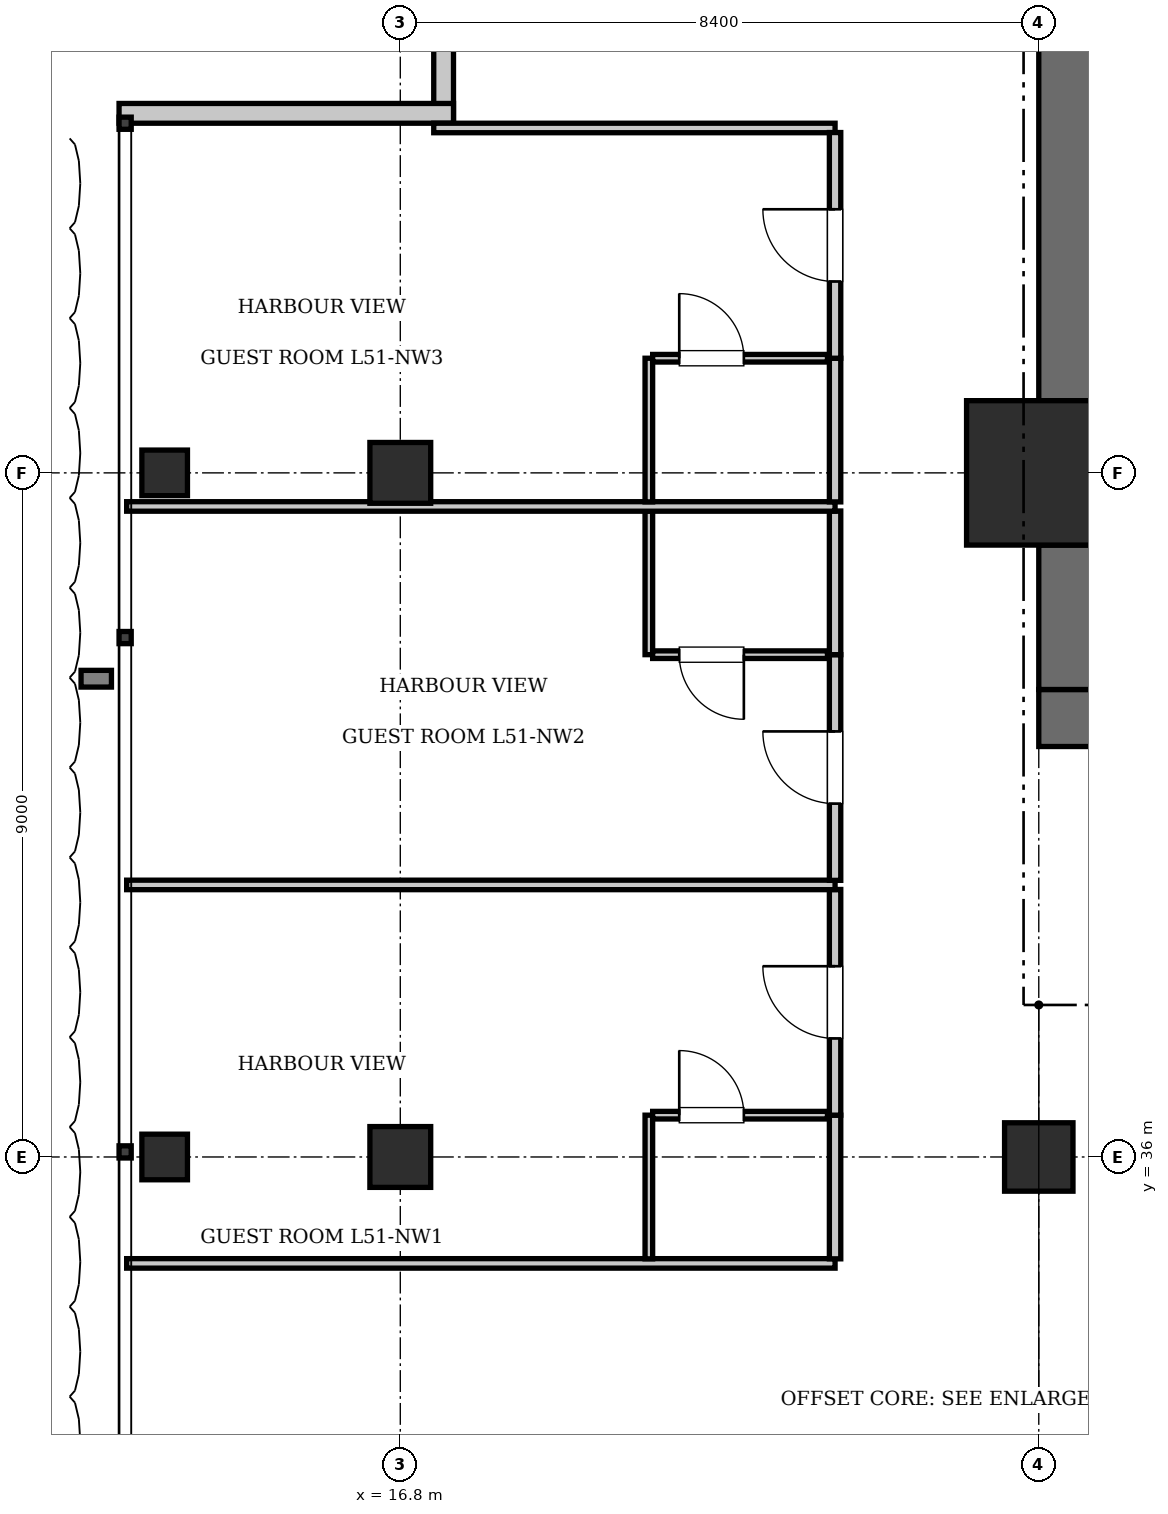
"""IFC4 building model, lengths in metres.
Left out: names, types, materials, properties, quantities, classifications, styles, units other than length and angle.
Written with IfcOpenShell. Run it as: python <this file> out.ifc"""

import sys

from ifc_helpers import new_model, si_unit, direction, frame, frame_2d, origin, origin_2d, place, context, subcontext, project, spatial, rectangle, i_section, extrude, element, fill, save


model = new_model("IFC4")
c1 = context("Model", 3, precision=1e-05, world=origin(), true_north=direction((0.0, 1.0)))
c2 = subcontext(c1, "Body", "Model", "MODEL_VIEW")
j1 = project(units=[si_unit("LENGTHUNIT", "METRE"), si_unit("PLANEANGLEUNIT", "RADIAN")], contexts=[c1])
p1 = place(None, origin())
s1 = spatial("IfcSite", under=j1, at=p1, CompositionType="ELEMENT")
p2 = place(p1, origin())
s2 = spatial("IfcBuilding", under=s1, at=p2, CompositionType="ELEMENT")
p3 = place(p2, frame((0.0, 0.0, 208.25)))
s3 = spatial("IfcBuildingStorey", under=s2, at=p3, CompositionType="ELEMENT", Elevation=208.25)
p4 = place(p3, frame((25.2, 45.0, 0.0), z_axis=(0.0, 0.0, 1.0), x_axis=(1.0, 0.0, 0.0)))
e1 = element("IfcColumn", 1, at=p4, inside=s3, PredefinedType="COLUMN", context=c2, shape_type="SweptSolid", body=[
    extrude(rectangle(XDim=1.9, YDim=1.9, at=origin_2d()), origin(), (0.0, 0.0, 1.0), 3.85),
])
p5 = place(p3, frame((25.2, 41.775, 0.0), z_axis=(0.0, 0.0, 1.0), x_axis=(1.0, 0.0, 0.0)))
e2 = element("IfcWall", 2, at=p5, inside=s3, PredefinedType="SHEAR", context=c2, shape_type="SweptSolid", body=[
    extrude(rectangle(XDim=6.8, YDim=0.75, at=frame_2d((3.4, 0.0))), origin(), (0.0, 0.0, 1.0), 3.85),
])
p6 = place(p5, frame((1.65, 0.0, 0.0)))
e3 = element("IfcOpeningElement", 3, at=p6, cuts=e2, PredefinedType="OPENING", context=c2, shape_type="SweptSolid", body=[
    extrude(rectangle(XDim=1.15, YDim=2.15, at=frame_2d((0.575, 1.075))), frame((0.0, 0.385, 0.0), z_axis=(0.0, -1.0, 0.0), x_axis=(1.0, 0.0, 0.0)), (0.0, 0.0, 1.0), 0.77),
])
p7 = place(p5, frame((5.15, 0.0, 0.0)))
e4 = element("IfcOpeningElement", 4, at=p7, cuts=e2, PredefinedType="OPENING", context=c2, shape_type="SweptSolid", body=[
    extrude(rectangle(XDim=1.1, YDim=2.2, at=frame_2d((0.55, 1.1))), frame((0.0, 0.385, 0.0), z_axis=(0.0, -1.0, 0.0), x_axis=(1.0, 0.0, 0.0)), (0.0, 0.0, 1.0), 0.77),
])
p8 = place(p3, frame((25.575, 42.15, 0.0), z_axis=(0.0, 0.0, 1.0), x_axis=(0.0, 1.0, 0.0)))
e5 = element("IfcWall", 5, at=p8, inside=s3, PredefinedType="SHEAR", context=c2, shape_type="SweptSolid", body=[
    extrude(rectangle(XDim=1.9, YDim=0.75, at=frame_2d((0.95, 0.0))), origin(), (0.0, 0.0, 1.0), 3.85),
])
p9 = place(p3, frame((25.575, 45.95, 0.0), z_axis=(0.0, 0.0, 1.0), x_axis=(0.0, 1.0, 0.0)))
e6 = element("IfcWall", 6, at=p9, inside=s3, PredefinedType="SHEAR", context=c2, shape_type="SweptSolid", body=[
    extrude(rectangle(XDim=7.3, YDim=0.75, at=frame_2d((3.65, 0.0))), origin(), (0.0, 0.0, 1.0), 3.85),
])
p10 = place(p3, frame((25.2, 36.0, 0.0), z_axis=(0.0, 0.0, 1.0), x_axis=(1.0, 0.0, 0.0)))
e7 = element("IfcColumn", 7, at=p10, inside=s3, PredefinedType="COLUMN", context=c2, shape_type="SweptSolid", body=[
    extrude(rectangle(XDim=0.9, YDim=0.9, at=origin_2d()), origin(), (0.0, 0.0, 1.0), 3.85),
])
for number, where, z_axis, x_axis in (
    (8, (16.8, 36.0, 0.0), (0.0, 0.0, 1.0), (1.0, 0.0, 0.0)),
    (9, (16.8, 45.0, 0.0), (0.0, 0.0, 1.0), (1.0, 0.0, 0.0)),
):
    element("IfcColumn", number, at=place(p3, frame(where, z_axis=z_axis, x_axis=x_axis)), inside=s3, PredefinedType="COLUMN", context=c2, shape_type="SweptSolid", body=[
        extrude(rectangle(XDim=0.8, YDim=0.8, at=origin_2d()), origin(), (0.0, 0.0, 1.0), 3.85),
    ])
for number, where, z_axis, x_axis in (
    (10, (13.7, 36.0, 0.0), (0.0, 0.0, 1.0), (1.0, 0.0, 0.0)),
    (11, (13.7, 45.0, 0.0), (0.0, 0.0, 1.0), (1.0, 0.0, 0.0)),
):
    element("IfcColumn", number, at=place(p3, frame(where, z_axis=z_axis, x_axis=x_axis)), inside=s3, PredefinedType="COLUMN", context=c2, shape_type="SweptSolid", body=[
        extrude(i_section(OverallWidth=0.6, OverallDepth=0.6, WebThickness=0.025, FlangeThickness=0.038, at=origin_2d()), origin(), (0.0, 0.0, 1.0), 3.85),
    ])
for number, where, z_axis, x_axis in (
    (12, (17.37, 49.6, 0.0), (0.0, 0.0, 1.0), (0.0, 1.0, 0.0)),
    (13, (13.1, 49.73, 0.0), (0.0, 0.0, 1.0), (1.0, 0.0, 0.0)),
):
    element("IfcWall", number, at=place(p3, frame(where, z_axis=z_axis, x_axis=x_axis)), inside=s3, PredefinedType="SOLIDWALL", context=c2, shape_type="SweptSolid", body=[
        extrude(rectangle(XDim=4.4, YDim=0.26, at=frame_2d((2.2, 0.0))), origin(), (0.0, 0.0, 1.0), 3.61),
    ])
p11 = place(p3, frame((13.2, 34.6, 0.0), z_axis=(0.0, 0.0, 1.0), x_axis=(1.0, 0.0, 0.0)))
e14 = element("IfcWall", 14, at=p11, inside=s3, PredefinedType="PARTITIONING", context=c2, shape_type="SweptSolid", body=[
    extrude(rectangle(XDim=9.32, YDim=0.125, at=frame_2d((4.66, 0.0))), origin(), (0.0, 0.0, 1.0), 3.61),
])
p12 = place(p3, frame((17.24, 49.538, 0.0), z_axis=(0.0, 0.0, 1.0), x_axis=(1.0, 0.0, 0.0)))
e15 = element("IfcWall", 15, at=p12, inside=s3, PredefinedType="PARTITIONING", context=c2, shape_type="SweptSolid", body=[
    extrude(rectangle(XDim=5.28, YDim=0.125, at=frame_2d((2.64, 0.0))), origin(), (0.0, 0.0, 1.0), 3.61),
])
p13 = place(p3, frame((22.52, 34.66, 0.0), z_axis=(0.0, 0.0, 1.0), x_axis=(0.0, 1.0, 0.0)))
e16 = element("IfcWall", 16, at=p13, inside=s3, PredefinedType="PARTITIONING", context=c2, shape_type="SweptSolid", body=[
    extrude(rectangle(XDim=1.89, YDim=0.15, at=frame_2d((0.945, 0.0))), origin(), (0.0, 0.0, 1.0), 3.61),
])
p14 = place(p3, frame((22.52, 36.55, 0.0), z_axis=(0.0, 0.0, 1.0), x_axis=(0.0, 1.0, 0.0)))
e17 = element("IfcWall", 17, at=p14, inside=s3, PredefinedType="PARTITIONING", context=c2, shape_type="SweptSolid", body=[
    extrude(rectangle(XDim=2.969, YDim=0.15, at=frame_2d((1.485, 0.0))), origin(), (0.0, 0.0, 1.0), 3.61),
])
p15 = place(p14, frame((1.01, 0.0, 0.0)))
e18 = element("IfcOpeningElement", 18, at=p15, cuts=e17, PredefinedType="OPENING", context=c2, shape_type="SweptSolid", body=[
    extrude(rectangle(XDim=0.95, YDim=2.15, at=frame_2d((0.475, 1.075))), frame((0.0, 0.085, 0.0), z_axis=(0.0, -1.0, 0.0), x_axis=(1.0, 0.0, 0.0)), (0.0, 0.0, 1.0), 0.17),
])
p16 = place(p3, frame((20.07, 34.66, 0.0), z_axis=(0.0, 0.0, 1.0), x_axis=(0.0, 1.0, 0.0)))
e19 = element("IfcWall", 19, at=p16, inside=s3, PredefinedType="PARTITIONING", context=c2, shape_type="SweptSolid", body=[
    extrude(rectangle(XDim=1.89, YDim=0.1, at=frame_2d((0.945, 0.0))), origin(), (0.0, 0.0, 1.0), 3.61),
])
p17 = place(p3, frame((20.12, 36.55, 0.0), z_axis=(0.0, 0.0, 1.0), x_axis=(1.0, 0.0, 0.0)))
e20 = element("IfcWall", 20, at=p17, inside=s3, PredefinedType="PARTITIONING", context=c2, shape_type="SweptSolid", body=[
    extrude(rectangle(XDim=2.3, YDim=0.1, at=frame_2d((1.15, 0.0))), origin(), (0.0, 0.0, 1.0), 3.61),
])
p18 = place(p17, frame((0.35, 0.0, 0.0)))
e21 = element("IfcOpeningElement", 21, at=p18, cuts=e20, PredefinedType="OPENING", context=c2, shape_type="SweptSolid", body=[
    extrude(rectangle(XDim=0.85, YDim=2.1, at=frame_2d((0.425, 1.05))), frame((0.0, 0.06, 0.0), z_axis=(0.0, -1.0, 0.0), x_axis=(1.0, 0.0, 0.0)), (0.0, 0.0, 1.0), 0.12),
])
p19 = place(p3, frame((13.2, 39.579, 0.0), z_axis=(0.0, 0.0, 1.0), x_axis=(1.0, 0.0, 0.0)))
e22 = element("IfcWall", 22, at=p19, inside=s3, PredefinedType="PARTITIONING", context=c2, shape_type="SweptSolid", body=[
    extrude(rectangle(XDim=9.32, YDim=0.125, at=frame_2d((4.66, 0.0))), origin(), (0.0, 0.0, 1.0), 3.61),
])
p20 = place(p3, frame((22.52, 39.639, 0.0), z_axis=(0.0, 0.0, 1.0), x_axis=(0.0, 1.0, 0.0)))
e23 = element("IfcWall", 23, at=p20, inside=s3, PredefinedType="PARTITIONING", context=c2, shape_type="SweptSolid", body=[
    extrude(rectangle(XDim=2.969, YDim=0.15, at=frame_2d((1.485, 0.0))), origin(), (0.0, 0.0, 1.0), 3.61),
])
p21 = place(p20, frame((1.01, 0.0, 0.0)))
e24 = element("IfcOpeningElement", 24, at=p21, cuts=e23, PredefinedType="OPENING", context=c2, shape_type="SweptSolid", body=[
    extrude(rectangle(XDim=0.95, YDim=2.15, at=frame_2d((0.475, 1.075))), frame((0.0, 0.085, 0.0), z_axis=(0.0, -1.0, 0.0), x_axis=(1.0, 0.0, 0.0)), (0.0, 0.0, 1.0), 0.17),
])
p22 = place(p3, frame((22.52, 42.608, 0.0), z_axis=(0.0, 0.0, 1.0), x_axis=(0.0, 1.0, 0.0)))
e25 = element("IfcWall", 25, at=p22, inside=s3, PredefinedType="PARTITIONING", context=c2, shape_type="SweptSolid", body=[
    extrude(rectangle(XDim=1.89, YDim=0.15, at=frame_2d((0.945, 0.0))), origin(), (0.0, 0.0, 1.0), 3.61),
])
p23 = place(p3, frame((20.07, 42.608, 0.0), z_axis=(0.0, 0.0, 1.0), x_axis=(0.0, 1.0, 0.0)))
e26 = element("IfcWall", 26, at=p23, inside=s3, PredefinedType="PARTITIONING", context=c2, shape_type="SweptSolid", body=[
    extrude(rectangle(XDim=1.89, YDim=0.1, at=frame_2d((0.945, 0.0))), origin(), (0.0, 0.0, 1.0), 3.61),
])
p24 = place(p3, frame((20.12, 42.608, 0.0), z_axis=(0.0, 0.0, 1.0), x_axis=(1.0, 0.0, 0.0)))
e27 = element("IfcWall", 27, at=p24, inside=s3, PredefinedType="PARTITIONING", context=c2, shape_type="SweptSolid", body=[
    extrude(rectangle(XDim=2.3, YDim=0.1, at=frame_2d((1.15, 0.0))), origin(), (0.0, 0.0, 1.0), 3.61),
])
p25 = place(p24, frame((0.35, 0.0, 0.0)))
e28 = element("IfcOpeningElement", 28, at=p25, cuts=e27, PredefinedType="OPENING", context=c2, shape_type="SweptSolid", body=[
    extrude(rectangle(XDim=0.85, YDim=2.1, at=frame_2d((0.425, 1.05))), frame((0.0, 0.06, 0.0), z_axis=(0.0, -1.0, 0.0), x_axis=(1.0, 0.0, 0.0)), (0.0, 0.0, 1.0), 0.12),
])
p26 = place(p3, frame((13.2, 44.558, 0.0), z_axis=(0.0, 0.0, 1.0), x_axis=(1.0, 0.0, 0.0)))
e29 = element("IfcWall", 29, at=p26, inside=s3, PredefinedType="PARTITIONING", context=c2, shape_type="SweptSolid", body=[
    extrude(rectangle(XDim=9.32, YDim=0.125, at=frame_2d((4.66, 0.0))), origin(), (0.0, 0.0, 1.0), 3.61),
])
p27 = place(p3, frame((22.52, 44.618, 0.0), z_axis=(0.0, 0.0, 1.0), x_axis=(0.0, 1.0, 0.0)))
e30 = element("IfcWall", 30, at=p27, inside=s3, PredefinedType="PARTITIONING", context=c2, shape_type="SweptSolid", body=[
    extrude(rectangle(XDim=1.89, YDim=0.15, at=frame_2d((0.945, 0.0))), origin(), (0.0, 0.0, 1.0), 3.61),
])
p28 = place(p3, frame((22.52, 46.508, 0.0), z_axis=(0.0, 0.0, 1.0), x_axis=(0.0, 1.0, 0.0)))
e31 = element("IfcWall", 31, at=p28, inside=s3, PredefinedType="PARTITIONING", context=c2, shape_type="SweptSolid", body=[
    extrude(rectangle(XDim=2.969, YDim=0.15, at=frame_2d((1.485, 0.0))), origin(), (0.0, 0.0, 1.0), 3.61),
])
p29 = place(p28, frame((1.01, 0.0, 0.0)))
e32 = element("IfcOpeningElement", 32, at=p29, cuts=e31, PredefinedType="OPENING", context=c2, shape_type="SweptSolid", body=[
    extrude(rectangle(XDim=0.95, YDim=2.15, at=frame_2d((0.475, 1.075))), frame((0.0, 0.085, 0.0), z_axis=(0.0, -1.0, 0.0), x_axis=(1.0, 0.0, 0.0)), (0.0, 0.0, 1.0), 0.17),
])
p30 = place(p3, frame((20.07, 44.618, 0.0), z_axis=(0.0, 0.0, 1.0), x_axis=(0.0, 1.0, 0.0)))
e33 = element("IfcWall", 33, at=p30, inside=s3, PredefinedType="PARTITIONING", context=c2, shape_type="SweptSolid", body=[
    extrude(rectangle(XDim=1.89, YDim=0.1, at=frame_2d((0.945, 0.0))), origin(), (0.0, 0.0, 1.0), 3.61),
])
p31 = place(p3, frame((20.12, 46.508, 0.0), z_axis=(0.0, 0.0, 1.0), x_axis=(1.0, 0.0, 0.0)))
e34 = element("IfcWall", 34, at=p31, inside=s3, PredefinedType="PARTITIONING", context=c2, shape_type="SweptSolid", body=[
    extrude(rectangle(XDim=2.3, YDim=0.1, at=frame_2d((1.15, 0.0))), origin(), (0.0, 0.0, 1.0), 3.61),
])
p32 = place(p31, frame((0.35, 0.0, 0.0)))
e35 = element("IfcOpeningElement", 35, at=p32, cuts=e34, PredefinedType="OPENING", context=c2, shape_type="SweptSolid", body=[
    extrude(rectangle(XDim=0.85, YDim=2.1, at=frame_2d((0.425, 1.05))), frame((0.0, 0.06, 0.0), z_axis=(0.0, -1.0, 0.0), x_axis=(1.0, 0.0, 0.0)), (0.0, 0.0, 1.0), 0.12),
])
p33 = place(p18, origin())
e36 = element("IfcDoor", 36, at=p33, inside=s3, OperationType="SINGLE_SWING_LEFT", PredefinedType="DOOR", context=c2, shape_type="SweptSolid", body=[
    extrude(rectangle(XDim=0.85, YDim=2.1, at=frame_2d((0.425, 1.05))), frame((0.0, 0.025, 0.0), z_axis=(0.0, -1.0, 0.0), x_axis=(1.0, 0.0, 0.0)), (0.0, 0.0, 1.0), 0.05),
])
fill(e21, e36)
p34 = place(p15, origin())
e37 = element("IfcDoor", 37, at=p34, inside=s3, OperationType="SINGLE_SWING_RIGHT", PredefinedType="DOOR", context=c2, shape_type="SweptSolid", body=[
    extrude(rectangle(XDim=0.95, YDim=2.15, at=frame_2d((0.475, 1.075))), frame((0.0, 0.025, 0.0), z_axis=(0.0, -1.0, 0.0), x_axis=(1.0, 0.0, 0.0)), (0.0, 0.0, 1.0), 0.05),
])
fill(e18, e37)
p35 = place(p25, frame((0.85, 0.0, 0.0), z_axis=(0.0, 0.0, 1.0), x_axis=(-1.0, 0.0, 0.0)))
e38 = element("IfcDoor", 38, at=p35, inside=s3, OperationType="SINGLE_SWING_LEFT", PredefinedType="DOOR", context=c2, shape_type="SweptSolid", body=[
    extrude(rectangle(XDim=0.85, YDim=2.1, at=frame_2d((0.425, 1.05))), frame((0.0, 0.025, 0.0), z_axis=(0.0, -1.0, 0.0), x_axis=(1.0, 0.0, 0.0)), (0.0, 0.0, 1.0), 0.05),
])
fill(e28, e38)
p36 = place(p21, origin())
e39 = element("IfcDoor", 39, at=p36, inside=s3, OperationType="SINGLE_SWING_RIGHT", PredefinedType="DOOR", context=c2, shape_type="SweptSolid", body=[
    extrude(rectangle(XDim=0.95, YDim=2.15, at=frame_2d((0.475, 1.075))), frame((0.0, 0.025, 0.0), z_axis=(0.0, -1.0, 0.0), x_axis=(1.0, 0.0, 0.0)), (0.0, 0.0, 1.0), 0.05),
])
fill(e24, e39)
p37 = place(p32, origin())
e40 = element("IfcDoor", 40, at=p37, inside=s3, OperationType="SINGLE_SWING_LEFT", PredefinedType="DOOR", context=c2, shape_type="SweptSolid", body=[
    extrude(rectangle(XDim=0.85, YDim=2.1, at=frame_2d((0.425, 1.05))), frame((0.0, 0.025, 0.0), z_axis=(0.0, -1.0, 0.0), x_axis=(1.0, 0.0, 0.0)), (0.0, 0.0, 1.0), 0.05),
])
fill(e35, e40)
p38 = place(p29, origin())
e41 = element("IfcDoor", 41, at=p38, inside=s3, OperationType="SINGLE_SWING_RIGHT", PredefinedType="DOOR", context=c2, shape_type="SweptSolid", body=[
    extrude(rectangle(XDim=0.95, YDim=2.15, at=frame_2d((0.475, 1.075))), frame((0.0, 0.025, 0.0), z_axis=(0.0, -1.0, 0.0), x_axis=(1.0, 0.0, 0.0)), (0.0, 0.0, 1.0), 0.05),
])
fill(e32, e41)
save(model, sys.argv[1])
